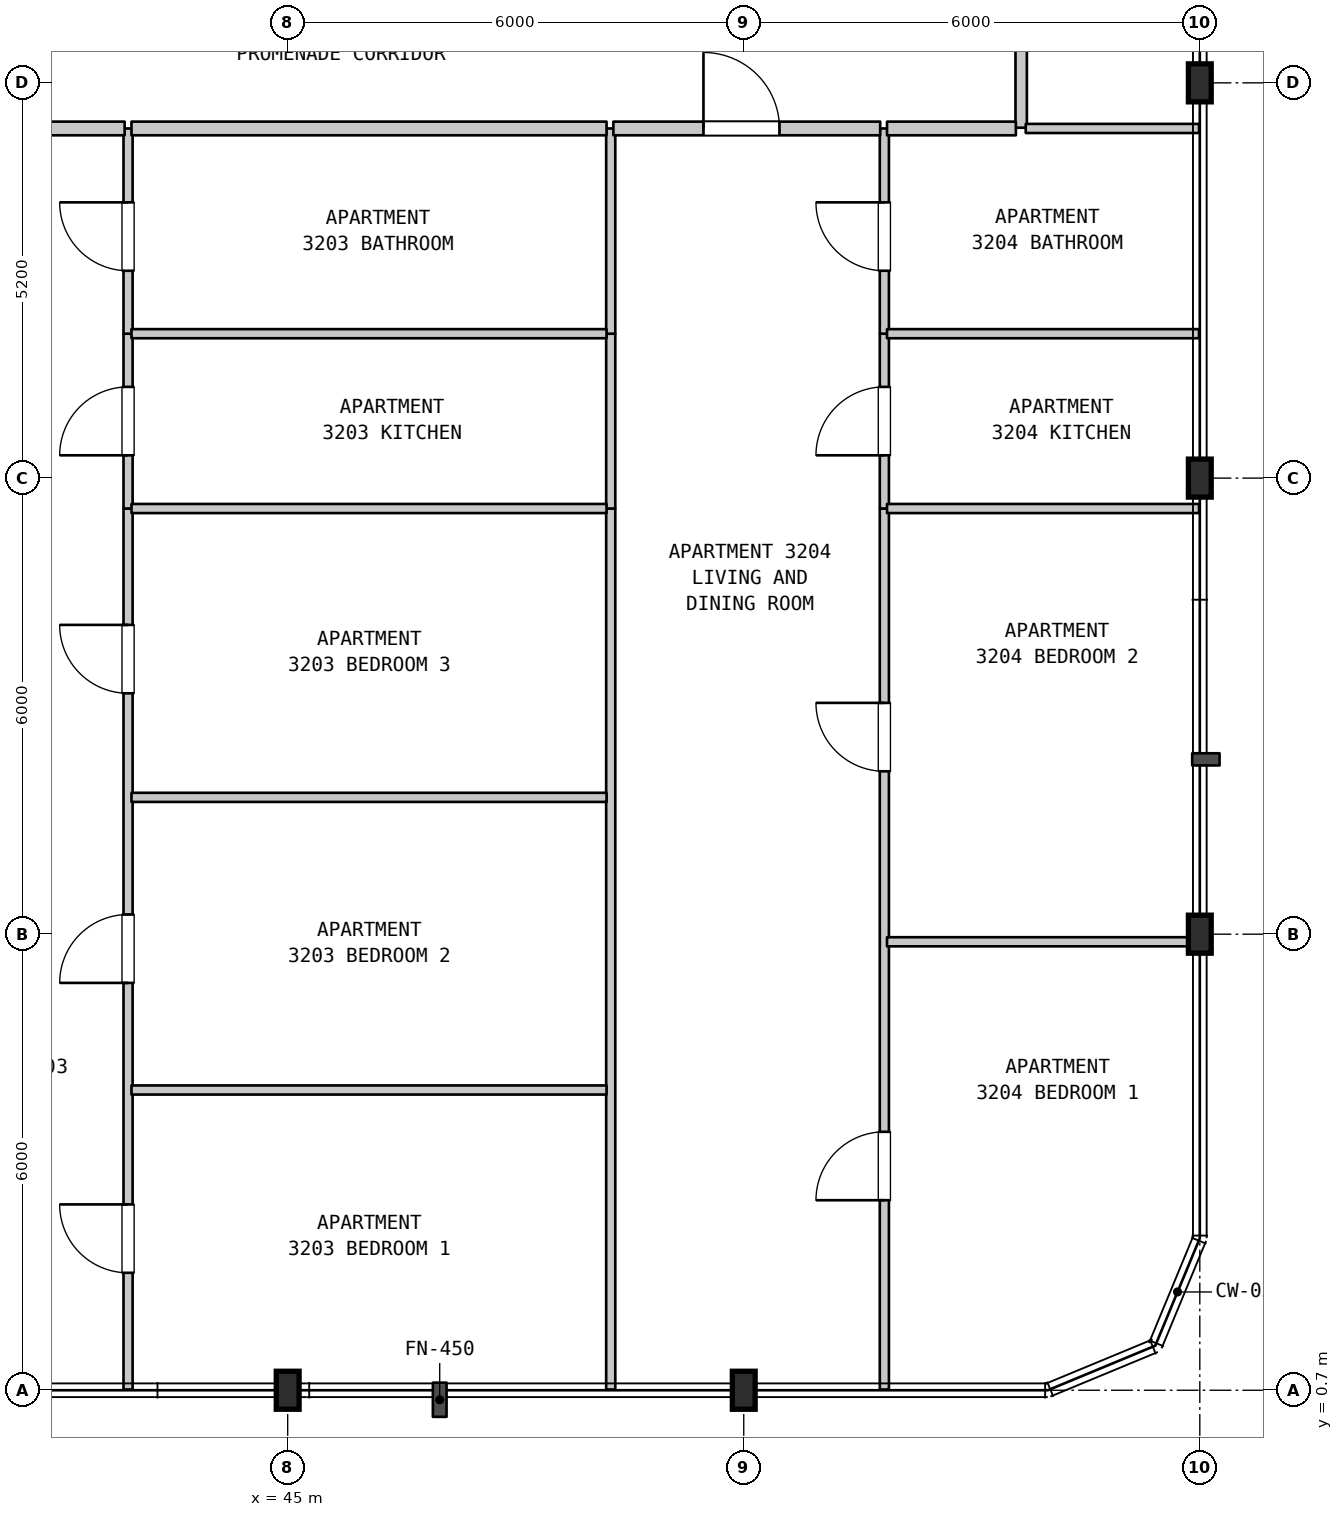
"""IFC4 building model, lengths in metres.
Left out: names, types, materials, properties, quantities, classifications, styles, units other than length and angle.
Written with IfcOpenShell. Run it as: python <this file> out.ifc"""

import sys

from ifc_helpers import new_model, si_unit, direction, frame, frame_2d, origin, origin_2d, place, context, subcontext, project, spatial, rectangle, i_section, extrude, element, fill, save


model = new_model("IFC4")
c1 = context("Model", 3, precision=1e-05, world=origin(), true_north=direction((0.0, 1.0)))
c2 = subcontext(c1, "Body", "Model", "MODEL_VIEW")
j1 = project(units=[si_unit("LENGTHUNIT", "METRE"), si_unit("PLANEANGLEUNIT", "RADIAN")], contexts=[c1])
p1 = place(None, origin())
s1 = spatial("IfcSite", under=j1, at=p1, CompositionType="ELEMENT")
p2 = place(p1, origin())
s2 = spatial("IfcBuilding", under=s1, at=p2, CompositionType="ELEMENT")
p3 = place(p2, frame((0.0, 0.0, 133.5)))
s3 = spatial("IfcBuildingStorey", under=s2, at=p3, CompositionType="ELEMENT", Elevation=133.5)
for number, where, z_axis, x_axis in (
    (1, (45.0, 0.7, 0.0), (0.0, 0.0, 1.0), (1.0, 0.0, 0.0)),
    (2, (51.0, 0.7, 0.0), (0.0, 0.0, 1.0), (1.0, 0.0, 0.0)),
    (3, (57.0, 6.7, 0.0), (0.0, 0.0, 1.0), (1.0, 0.0, 0.0)),
    (4, (57.0, 12.7, 0.0), (0.0, 0.0, 1.0), (1.0, 0.0, 0.0)),
    (5, (57.0, 17.9, 0.0), (0.0, 0.0, 1.0), (1.0, 0.0, 0.0)),
):
    element("IfcColumn", number, at=place(p3, frame(where, z_axis=z_axis, x_axis=x_axis)), inside=s3, PredefinedType="COLUMN", context=c2, shape_type="SweptSolid", body=[
        extrude(i_section(OverallWidth=0.3, OverallDepth=0.5, WebThickness=0.014, FlangeThickness=0.028, FilletRadius=0.027, at=origin_2d()), origin(), (0.0, 0.0, 1.0), 3.7),
    ])
p4 = place(p3, frame((42.9, 0.71, 0.0), z_axis=(0.0, 0.0, 1.0), x_axis=(0.0, 1.0, 0.0)))
e6 = element("IfcWall", 6, at=p4, inside=s3, PredefinedType="PARTITIONING", context=c2, shape_type="SweptSolid", body=[
    extrude(rectangle(XDim=11.59, YDim=0.12, at=frame_2d((5.795, 0.0))), origin(), (0.0, 0.0, 1.0), 3.385),
])
p5 = place(p4, frame((1.535, 0.0, 0.0)))
e7 = element("IfcOpeningElement", 7, at=p5, cuts=e6, PredefinedType="OPENING", context=c2, shape_type="SweptSolid", body=[
    extrude(rectangle(XDim=0.9, YDim=2.15, at=frame_2d((0.45, 1.075))), frame((0.0, 0.07, 0.0), z_axis=(0.0, -1.0, 0.0), x_axis=(1.0, 0.0, 0.0)), (0.0, 0.0, 1.0), 0.14),
])
p6 = place(p4, frame((5.349, 0.0, 0.0)))
e8 = element("IfcOpeningElement", 8, at=p6, cuts=e6, PredefinedType="OPENING", context=c2, shape_type="SweptSolid", body=[
    extrude(rectangle(XDim=0.9, YDim=2.15, at=frame_2d((0.45, 1.075))), frame((0.0, 0.07, 0.0), z_axis=(0.0, -1.0, 0.0), x_axis=(1.0, 0.0, 0.0)), (0.0, 0.0, 1.0), 0.14),
])
p7 = place(p4, frame((9.159, 0.0, 0.0)))
e9 = element("IfcOpeningElement", 9, at=p7, cuts=e6, PredefinedType="OPENING", context=c2, shape_type="SweptSolid", body=[
    extrude(rectangle(XDim=0.9, YDim=2.15, at=frame_2d((0.45, 1.075))), frame((0.0, 0.07, 0.0), z_axis=(0.0, -1.0, 0.0), x_axis=(1.0, 0.0, 0.0)), (0.0, 0.0, 1.0), 0.14),
])
p8 = place(p3, frame((42.9, 12.3, 0.0), z_axis=(0.0, 0.0, 1.0), x_axis=(0.0, 1.0, 0.0)))
e10 = element("IfcWall", 10, at=p8, inside=s3, PredefinedType="PARTITIONING", context=c2, shape_type="SweptSolid", body=[
    extrude(rectangle(XDim=2.3, YDim=0.12, at=frame_2d((1.15, 0.0))), origin(), (0.0, 0.0, 1.0), 3.385),
])
p9 = place(p8, frame((0.7, 0.0, 0.0)))
e11 = element("IfcOpeningElement", 11, at=p9, cuts=e10, PredefinedType="OPENING", context=c2, shape_type="SweptSolid", body=[
    extrude(rectangle(XDim=0.9, YDim=2.15, at=frame_2d((0.45, 1.075))), frame((0.0, 0.07, 0.0), z_axis=(0.0, -1.0, 0.0), x_axis=(1.0, 0.0, 0.0)), (0.0, 0.0, 1.0), 0.14),
])
p10 = place(p3, frame((42.9, 14.6, 0.0), z_axis=(0.0, 0.0, 1.0), x_axis=(0.0, 1.0, 0.0)))
e12 = element("IfcWall", 12, at=p10, inside=s3, PredefinedType="PARTITIONING", context=c2, shape_type="SweptSolid", body=[
    extrude(rectangle(XDim=2.7, YDim=0.12, at=frame_2d((1.35, 0.0))), origin(), (0.0, 0.0, 1.0), 3.385),
])
p11 = place(p10, frame((0.828, 0.0, 0.0)))
e13 = element("IfcOpeningElement", 13, at=p11, cuts=e12, PredefinedType="OPENING", context=c2, shape_type="SweptSolid", body=[
    extrude(rectangle(XDim=0.9, YDim=2.1, at=frame_2d((0.45, 1.05))), frame((0.0, 0.07, 0.0), z_axis=(0.0, -1.0, 0.0), x_axis=(1.0, 0.0, 0.0)), (0.0, 0.0, 1.0), 0.14),
])
p12 = place(p3, frame((49.25, 0.71, 0.0), z_axis=(0.0, 0.0, 1.0), x_axis=(0.0, 1.0, 0.0)))
e14 = element("IfcWall", 14, at=p12, inside=s3, PredefinedType="PARTITIONING", context=c2, shape_type="SweptSolid", body=[
    extrude(rectangle(XDim=11.59, YDim=0.12, at=frame_2d((5.795, 0.0))), origin(), (0.0, 0.0, 1.0), 3.385),
])
p13 = place(p3, frame((49.25, 12.3, 0.0), z_axis=(0.0, 0.0, 1.0), x_axis=(0.0, 1.0, 0.0)))
e15 = element("IfcWall", 15, at=p13, inside=s3, PredefinedType="PARTITIONING", context=c2, shape_type="SweptSolid", body=[
    extrude(rectangle(XDim=2.3, YDim=0.12, at=frame_2d((1.15, 0.0))), origin(), (0.0, 0.0, 1.0), 3.385),
])
p14 = place(p3, frame((49.25, 14.6, 0.0), z_axis=(0.0, 0.0, 1.0), x_axis=(0.0, 1.0, 0.0)))
e16 = element("IfcWall", 16, at=p14, inside=s3, PredefinedType="PARTITIONING", context=c2, shape_type="SweptSolid", body=[
    extrude(rectangle(XDim=2.7, YDim=0.12, at=frame_2d((1.35, 0.0))), origin(), (0.0, 0.0, 1.0), 3.385),
])
p15 = place(p3, frame((52.85, 0.71, 0.0), z_axis=(0.0, 0.0, 1.0), x_axis=(0.0, 1.0, 0.0)))
e17 = element("IfcWall", 17, at=p15, inside=s3, PredefinedType="PARTITIONING", context=c2, shape_type="SweptSolid", body=[
    extrude(rectangle(XDim=11.59, YDim=0.12, at=frame_2d((5.795, 0.0))), origin(), (0.0, 0.0, 1.0), 3.385),
])
p16 = place(p15, frame((2.49, 0.0, 0.0)))
e18 = element("IfcOpeningElement", 18, at=p16, cuts=e17, PredefinedType="OPENING", context=c2, shape_type="SweptSolid", body=[
    extrude(rectangle(XDim=0.9, YDim=2.15, at=frame_2d((0.45, 1.075))), frame((0.0, 0.07, 0.0), z_axis=(0.0, -1.0, 0.0), x_axis=(1.0, 0.0, 0.0)), (0.0, 0.0, 1.0), 0.14),
])
p17 = place(p15, frame((8.133, 0.0, 0.0)))
e19 = element("IfcOpeningElement", 19, at=p17, cuts=e17, PredefinedType="OPENING", context=c2, shape_type="SweptSolid", body=[
    extrude(rectangle(XDim=0.9, YDim=2.15, at=frame_2d((0.45, 1.075))), frame((0.0, 0.07, 0.0), z_axis=(0.0, -1.0, 0.0), x_axis=(1.0, 0.0, 0.0)), (0.0, 0.0, 1.0), 0.14),
])
p18 = place(p3, frame((52.85, 12.3, 0.0), z_axis=(0.0, 0.0, 1.0), x_axis=(0.0, 1.0, 0.0)))
e20 = element("IfcWall", 20, at=p18, inside=s3, PredefinedType="PARTITIONING", context=c2, shape_type="SweptSolid", body=[
    extrude(rectangle(XDim=2.3, YDim=0.12, at=frame_2d((1.15, 0.0))), origin(), (0.0, 0.0, 1.0), 3.385),
])
p19 = place(p18, frame((0.7, 0.0, 0.0)))
e21 = element("IfcOpeningElement", 21, at=p19, cuts=e20, PredefinedType="OPENING", context=c2, shape_type="SweptSolid", body=[
    extrude(rectangle(XDim=0.9, YDim=2.15, at=frame_2d((0.45, 1.075))), frame((0.0, 0.07, 0.0), z_axis=(0.0, -1.0, 0.0), x_axis=(1.0, 0.0, 0.0)), (0.0, 0.0, 1.0), 0.14),
])
p20 = place(p3, frame((52.85, 14.6, 0.0), z_axis=(0.0, 0.0, 1.0), x_axis=(0.0, 1.0, 0.0)))
e22 = element("IfcWall", 22, at=p20, inside=s3, PredefinedType="PARTITIONING", context=c2, shape_type="SweptSolid", body=[
    extrude(rectangle(XDim=2.7, YDim=0.12, at=frame_2d((1.35, 0.0))), origin(), (0.0, 0.0, 1.0), 3.385),
])
p21 = place(p20, frame((0.828, 0.0, 0.0)))
e23 = element("IfcOpeningElement", 23, at=p21, cuts=e22, PredefinedType="OPENING", context=c2, shape_type="SweptSolid", body=[
    extrude(rectangle(XDim=0.9, YDim=2.1, at=frame_2d((0.45, 1.05))), frame((0.0, 0.07, 0.0), z_axis=(0.0, -1.0, 0.0), x_axis=(1.0, 0.0, 0.0)), (0.0, 0.0, 1.0), 0.14),
])
p22 = place(p3, frame((54.65, 17.31, 0.0), z_axis=(0.0, 0.0, 1.0), x_axis=(0.0, 1.0, 0.0)))
e24 = element("IfcWall", 24, at=p22, inside=s3, PredefinedType="STANDARD", context=c2, shape_type="SweptSolid", body=[
    extrude(rectangle(XDim=2.19, YDim=0.15, at=frame_2d((1.095, 0.0))), origin(), (0.0, 0.0, 1.0), 3.385),
])
p23 = place(p3, frame((42.945, 4.65, 0.0), z_axis=(0.0, 0.0, 1.0), x_axis=(1.0, 0.0, 0.0)))
e25 = element("IfcWall", 25, at=p23, inside=s3, PredefinedType="PARTITIONING", context=c2, shape_type="SweptSolid", body=[
    extrude(rectangle(XDim=6.25, YDim=0.12, at=frame_2d((3.125, 0.0))), origin(), (0.0, 0.0, 1.0), 3.385),
])
p24 = place(p3, frame((52.885, 6.6, 0.0), z_axis=(0.0, 0.0, 1.0), x_axis=(1.0, 0.0, 0.0)))
e26 = element("IfcWall", 26, at=p24, inside=s3, PredefinedType="PARTITIONING", context=c2, shape_type="SweptSolid", body=[
    extrude(rectangle(XDim=4.105, YDim=0.12, at=frame_2d((2.052, 0.0))), origin(), (0.0, 0.0, 1.0), 2.785),
])
for number, where, z_axis, x_axis in (
    (27, (42.945, 8.5, 0.0), (0.0, 0.0, 1.0), (1.0, 0.0, 0.0)),
    (28, (42.945, 12.3, 0.0), (0.0, 0.0, 1.0), (1.0, 0.0, 0.0)),
):
    element("IfcWall", number, at=place(p3, frame(where, z_axis=z_axis, x_axis=x_axis)), inside=s3, PredefinedType="PARTITIONING", context=c2, shape_type="SweptSolid", body=[
        extrude(rectangle(XDim=6.25, YDim=0.12, at=frame_2d((3.125, 0.0))), origin(), (0.0, 0.0, 1.0), 3.385),
    ])
p25 = place(p3, frame((52.885, 12.3, 0.0), z_axis=(0.0, 0.0, 1.0), x_axis=(1.0, 0.0, 0.0)))
e29 = element("IfcWall", 29, at=p25, inside=s3, PredefinedType="PARTITIONING", context=c2, shape_type="SweptSolid", body=[
    extrude(rectangle(XDim=4.105, YDim=0.12, at=frame_2d((2.052, 0.0))), origin(), (0.0, 0.0, 1.0), 3.385),
])
p26 = place(p3, frame((42.945, 14.6, 0.0), z_axis=(0.0, 0.0, 1.0), x_axis=(1.0, 0.0, 0.0)))
e30 = element("IfcWall", 30, at=p26, inside=s3, PredefinedType="PARTITIONING", context=c2, shape_type="SweptSolid", body=[
    extrude(rectangle(XDim=6.25, YDim=0.12, at=frame_2d((3.125, 0.0))), origin(), (0.0, 0.0, 1.0), 3.385),
])
p27 = place(p3, frame((52.885, 14.6, 0.0), z_axis=(0.0, 0.0, 1.0), x_axis=(1.0, 0.0, 0.0)))
e31 = element("IfcWall", 31, at=p27, inside=s3, PredefinedType="PARTITIONING", context=c2, shape_type="SweptSolid", body=[
    extrude(rectangle(XDim=4.105, YDim=0.12, at=frame_2d((2.052, 0.0))), origin(), (0.0, 0.0, 1.0), 3.385),
])
p28 = place(p3, frame((38.895, 17.3, 0.0), z_axis=(0.0, 0.0, 1.0), x_axis=(1.0, 0.0, 0.0)))
e32 = element("IfcWall", 32, at=p28, inside=s3, PredefinedType="STANDARD", context=c2, shape_type="SweptSolid", body=[
    extrude(rectangle(XDim=3.96, YDim=0.18, at=frame_2d((1.98, 0.0))), origin(), (0.0, 0.0, 1.0), 3.385),
])
p29 = place(p28, frame((1.609, 0.0, 0.0)))
e33 = element("IfcOpeningElement", 33, at=p29, cuts=e32, PredefinedType="OPENING", context=c2, shape_type="SweptSolid", body=[
    extrude(rectangle(XDim=1.0, YDim=2.15, at=frame_2d((0.5, 1.075))), frame((0.0, 0.1, 0.0), z_axis=(0.0, -1.0, 0.0), x_axis=(1.0, 0.0, 0.0)), (0.0, 0.0, 1.0), 0.2),
])
p30 = place(p3, frame((42.945, 17.3, 0.0), z_axis=(0.0, 0.0, 1.0), x_axis=(1.0, 0.0, 0.0)))
e34 = element("IfcWall", 34, at=p30, inside=s3, PredefinedType="STANDARD", context=c2, shape_type="SweptSolid", body=[
    extrude(rectangle(XDim=6.25, YDim=0.18, at=frame_2d((3.125, 0.0))), origin(), (0.0, 0.0, 1.0), 3.385),
])
p31 = place(p3, frame((49.285, 17.3, 0.0), z_axis=(0.0, 0.0, 1.0), x_axis=(1.0, 0.0, 0.0)))
e35 = element("IfcWall", 35, at=p31, inside=s3, PredefinedType="STANDARD", context=c2, shape_type="SweptSolid", body=[
    extrude(rectangle(XDim=3.51, YDim=0.18, at=frame_2d((1.755, 0.0))), origin(), (0.0, 0.0, 1.0), 3.385),
])
p32 = place(p31, frame((1.185, 0.0, 0.0)))
e36 = element("IfcOpeningElement", 36, at=p32, cuts=e35, PredefinedType="OPENING", context=c2, shape_type="SweptSolid", body=[
    extrude(rectangle(XDim=1.0, YDim=2.15, at=frame_2d((0.5, 1.075))), frame((0.0, 0.1, 0.0), z_axis=(0.0, -1.0, 0.0), x_axis=(1.0, 0.0, 0.0)), (0.0, 0.0, 1.0), 0.2),
])
p33 = place(p3, frame((52.885, 17.3, 0.0), z_axis=(0.0, 0.0, 1.0), x_axis=(1.0, 0.0, 0.0)))
e37 = element("IfcWall", 37, at=p33, inside=s3, PredefinedType="STANDARD", context=c2, shape_type="SweptSolid", body=[
    extrude(rectangle(XDim=1.695, YDim=0.18, at=frame_2d((0.848, 0.0))), origin(), (0.0, 0.0, 1.0), 3.385),
])
p34 = place(p3, frame((54.71, 17.3, 0.0), z_axis=(0.0, 0.0, 1.0), x_axis=(1.0, 0.0, 0.0)))
e38 = element("IfcWall", 38, at=p34, inside=s3, PredefinedType="PARTITIONING", context=c2, shape_type="SweptSolid", body=[
    extrude(rectangle(XDim=2.28, YDim=0.12, at=frame_2d((1.14, 0.0))), origin(), (0.0, 0.0, 1.0), 3.385),
])
p35 = place(p5, origin())
e39 = element("IfcDoor", 39, at=p35, inside=s3, OperationType="SINGLE_SWING_RIGHT", PredefinedType="DOOR", context=c2, shape_type="SweptSolid", body=[
    extrude(rectangle(XDim=0.9, YDim=2.15, at=frame_2d((0.45, 1.075))), frame((0.0, 0.025, 0.0), z_axis=(0.0, -1.0, 0.0), x_axis=(1.0, 0.0, 0.0)), (0.0, 0.0, 1.0), 0.05),
])
fill(e7, e39)
p36 = place(p6, origin())
e40 = element("IfcDoor", 40, at=p36, inside=s3, OperationType="SINGLE_SWING_LEFT", PredefinedType="DOOR", context=c2, shape_type="SweptSolid", body=[
    extrude(rectangle(XDim=0.9, YDim=2.15, at=frame_2d((0.45, 1.075))), frame((0.0, 0.025, 0.0), z_axis=(0.0, -1.0, 0.0), x_axis=(1.0, 0.0, 0.0)), (0.0, 0.0, 1.0), 0.05),
])
fill(e8, e40)
p37 = place(p7, origin())
e41 = element("IfcDoor", 41, at=p37, inside=s3, OperationType="SINGLE_SWING_RIGHT", PredefinedType="DOOR", context=c2, shape_type="SweptSolid", body=[
    extrude(rectangle(XDim=0.9, YDim=2.15, at=frame_2d((0.45, 1.075))), frame((0.0, 0.025, 0.0), z_axis=(0.0, -1.0, 0.0), x_axis=(1.0, 0.0, 0.0)), (0.0, 0.0, 1.0), 0.05),
])
fill(e9, e41)
p38 = place(p9, origin())
e42 = element("IfcDoor", 42, at=p38, inside=s3, OperationType="SINGLE_SWING_LEFT", PredefinedType="DOOR", context=c2, shape_type="SweptSolid", body=[
    extrude(rectangle(XDim=0.9, YDim=2.15, at=frame_2d((0.45, 1.075))), frame((0.0, 0.025, 0.0), z_axis=(0.0, -1.0, 0.0), x_axis=(1.0, 0.0, 0.0)), (0.0, 0.0, 1.0), 0.05),
])
fill(e11, e42)
p39 = place(p11, origin())
e43 = element("IfcDoor", 43, at=p39, inside=s3, OperationType="SINGLE_SWING_RIGHT", PredefinedType="DOOR", context=c2, shape_type="SweptSolid", body=[
    extrude(rectangle(XDim=0.9, YDim=2.1, at=frame_2d((0.45, 1.05))), frame((0.0, 0.025, 0.0), z_axis=(0.0, -1.0, 0.0), x_axis=(1.0, 0.0, 0.0)), (0.0, 0.0, 1.0), 0.05),
])
fill(e13, e43)
p40 = place(p16, origin())
e44 = element("IfcDoor", 44, at=p40, inside=s3, OperationType="SINGLE_SWING_LEFT", PredefinedType="DOOR", context=c2, shape_type="SweptSolid", body=[
    extrude(rectangle(XDim=0.9, YDim=2.15, at=frame_2d((0.45, 1.075))), frame((0.0, 0.025, 0.0), z_axis=(0.0, -1.0, 0.0), x_axis=(1.0, 0.0, 0.0)), (0.0, 0.0, 1.0), 0.05),
])
fill(e18, e44)
p41 = place(p17, origin())
e45 = element("IfcDoor", 45, at=p41, inside=s3, OperationType="SINGLE_SWING_RIGHT", PredefinedType="DOOR", context=c2, shape_type="SweptSolid", body=[
    extrude(rectangle(XDim=0.9, YDim=2.15, at=frame_2d((0.45, 1.075))), frame((0.0, 0.025, 0.0), z_axis=(0.0, -1.0, 0.0), x_axis=(1.0, 0.0, 0.0)), (0.0, 0.0, 1.0), 0.05),
])
fill(e19, e45)
p42 = place(p19, origin())
e46 = element("IfcDoor", 46, at=p42, inside=s3, OperationType="SINGLE_SWING_LEFT", PredefinedType="DOOR", context=c2, shape_type="SweptSolid", body=[
    extrude(rectangle(XDim=0.9, YDim=2.15, at=frame_2d((0.45, 1.075))), frame((0.0, 0.025, 0.0), z_axis=(0.0, -1.0, 0.0), x_axis=(1.0, 0.0, 0.0)), (0.0, 0.0, 1.0), 0.05),
])
fill(e21, e46)
p43 = place(p21, origin())
e47 = element("IfcDoor", 47, at=p43, inside=s3, OperationType="SINGLE_SWING_RIGHT", PredefinedType="DOOR", context=c2, shape_type="SweptSolid", body=[
    extrude(rectangle(XDim=0.9, YDim=2.1, at=frame_2d((0.45, 1.05))), frame((0.0, 0.025, 0.0), z_axis=(0.0, -1.0, 0.0), x_axis=(1.0, 0.0, 0.0)), (0.0, 0.0, 1.0), 0.05),
])
fill(e23, e47)
p44 = place(p32, origin())
e48 = element("IfcDoor", 48, at=p44, inside=s3, OperationType="SINGLE_SWING_LEFT", PredefinedType="DOOR", context=c2, shape_type="SweptSolid", body=[
    extrude(rectangle(XDim=1.0, YDim=2.15, at=frame_2d((0.5, 1.075))), frame((0.0, 0.025, 0.0), z_axis=(0.0, -1.0, 0.0), x_axis=(1.0, 0.0, 0.0)), (0.0, 0.0, 1.0), 0.05),
])
fill(e36, e48)
save(model, sys.argv[1])
